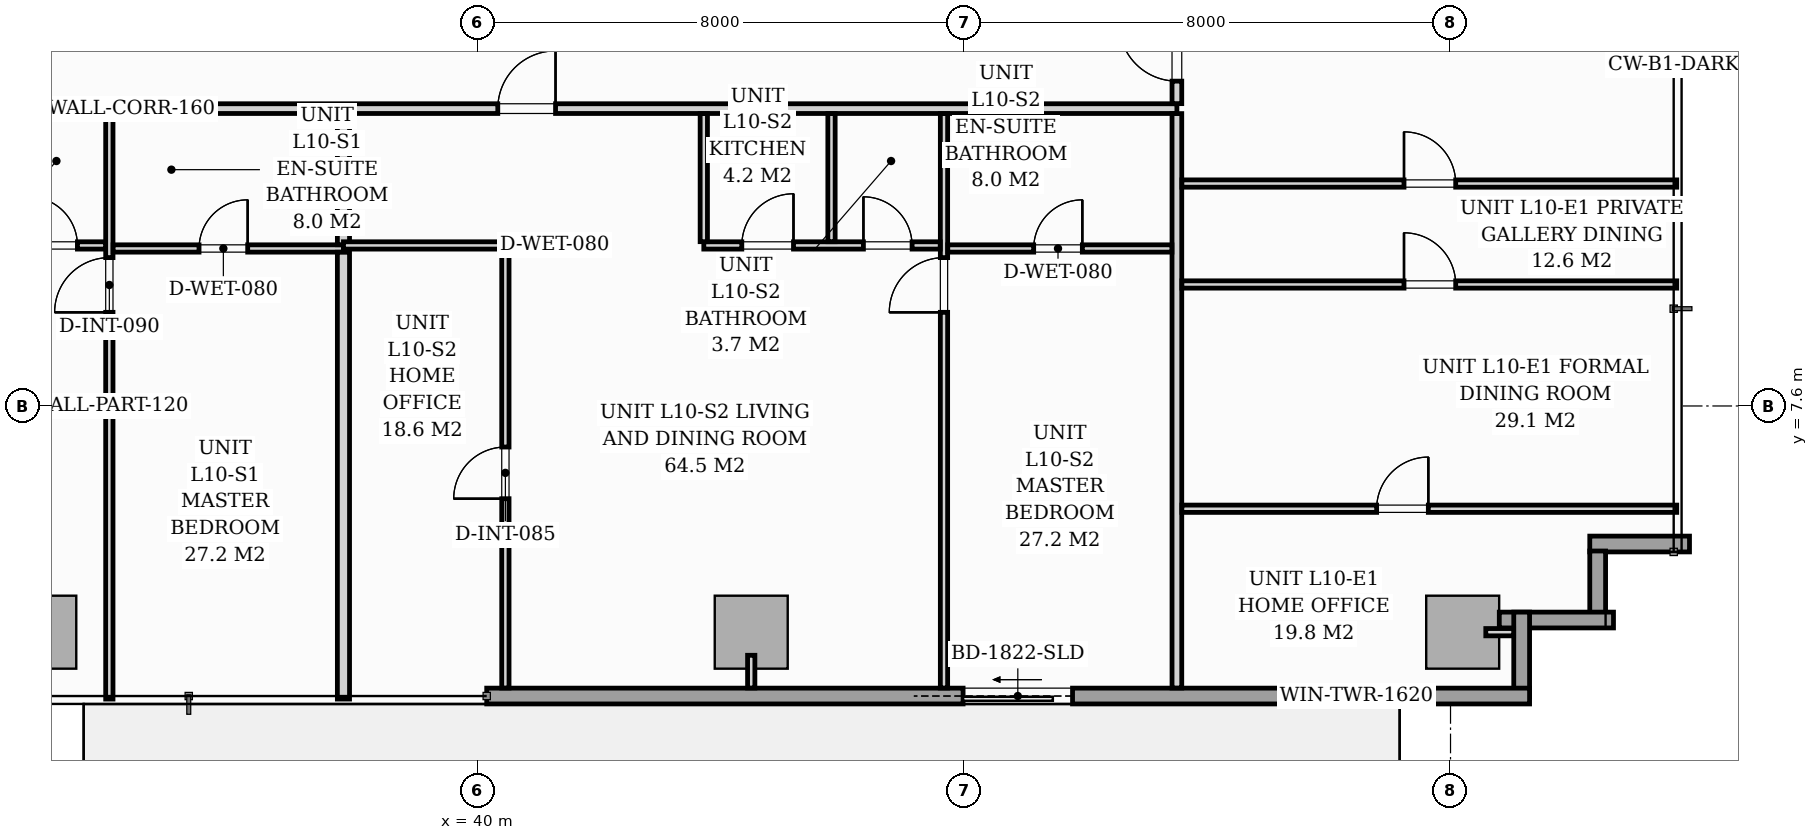
"""IFC4 building model, lengths in metres.
Left out: names, types, materials, properties, quantities, classifications, styles, units other than length and angle.
Written with IfcOpenShell. Run it as: python <this file> out.ifc"""

import sys

from ifc_helpers import new_model, si_unit, direction, frame, frame_2d, origin, origin_2d, place, context, subcontext, project, spatial, rectangle, extrude, source, transform, mapped, element, fill, save


model = new_model("IFC4")
c1 = context("Model", 3, precision=1e-05, world=origin(), true_north=direction((0.0, 1.0)))
c2 = subcontext(c1, "Body", "Model", "MODEL_VIEW")
j1 = project(units=[si_unit("LENGTHUNIT", "METRE"), si_unit("PLANEANGLEUNIT", "RADIAN")], contexts=[c1])
p1 = place(None, origin())
s1 = spatial("IfcSite", under=j1, at=p1, CompositionType="ELEMENT")
p2 = place(p1, origin())
s2 = spatial("IfcBuilding", under=s1, at=p2, CompositionType="ELEMENT")
p3 = place(p2, frame((0.0, 0.0, 39.0)))
s3 = spatial("IfcBuildingStorey", under=s2, at=p3, CompositionType="ELEMENT", Elevation=39.0)
m1 = source(origin(), c2, "Body", "SweptSolid", [
    extrude(rectangle(XDim=1.2, YDim=1.2, at=origin_2d()), origin(), (0.0, 0.0, 1.0), 3.196),
])
for number, where, z_axis, x_axis in (
    (1, (32.8, 3.88, 0.002), (0.0, 0.0, 1.0), (1.0, 0.0, 0.0)),
    (2, (44.5, 3.88, 0.002), (0.0, 0.0, 1.0), (1.0, 0.0, 0.0)),
    (3, (56.2, 3.88, 0.002), (0.0, 0.0, 1.0), (1.0, 0.0, 0.0)),
):
    element("IfcColumn", number, at=place(p3, frame(where, z_axis=z_axis, x_axis=x_axis)), inside=s3, PredefinedType="COLUMN", context=c2, shape_type="MappedRepresentation", body=[
        mapped(m1, transform((0.0, 0.0, 0.0), scale=1.0)),
    ])
p4 = place(p3, frame((59.93, 5.33, 0.0), z_axis=(0.0, 0.0, 1.0), x_axis=(-1.0, 0.0, 0.0)))
e4 = element("IfcWall", 4, at=p4, inside=s3, PredefinedType="STANDARD", context=c2, shape_type="SweptSolid", body=[
    extrude(rectangle(XDim=1.64, YDim=0.26, at=frame_2d((0.82, 0.0))), origin(), (0.0, 0.0, 1.0), 2.94),
])
p5 = place(p3, frame((58.42, 5.215, 0.0), z_axis=(0.0, 0.0, 1.0), x_axis=(0.0, -1.0, 0.0)))
e5 = element("IfcWall", 5, at=p5, inside=s3, PredefinedType="STANDARD", context=c2, shape_type="SweptSolid", body=[
    extrude(rectangle(XDim=1.15, YDim=0.26, at=frame_2d((0.575, 0.0))), origin(), (0.0, 0.0, 1.0), 2.94),
])
p6 = place(p3, frame((58.68, 4.08, 0.0), z_axis=(0.0, 0.0, 1.0), x_axis=(-1.0, 0.0, 0.0)))
e6 = element("IfcWall", 6, at=p6, inside=s3, PredefinedType="STANDARD", context=c2, shape_type="SweptSolid", body=[
    extrude(rectangle(XDim=1.878, YDim=0.26, at=frame_2d((0.939, 0.0))), origin(), (0.0, 0.0, 1.0), 2.94),
])
p7 = place(p3, frame((57.17, 4.21, 0.0), z_axis=(0.0, 0.0, 1.0), x_axis=(0.0, -1.0, 0.0)))
e7 = element("IfcWall", 7, at=p7, inside=s3, PredefinedType="STANDARD", context=c2, shape_type="SweptSolid", body=[
    extrude(rectangle(XDim=1.395, YDim=0.26, at=frame_2d((0.698, 0.0))), origin(), (0.0, 0.0, 1.0), 2.94),
])
p8 = place(p3, frame((57.3, 2.83, 0.0), z_axis=(0.0, 0.0, 1.0), x_axis=(-1.0, 0.0, 0.0)))
e8 = element("IfcWall", 8, at=p8, inside=s3, PredefinedType="STANDARD", context=c2, shape_type="SweptSolid", body=[
    extrude(rectangle(XDim=17.15, YDim=0.26, at=frame_2d((8.575, 0.0))), origin(), (0.0, 0.0, 1.0), 2.94),
])
p9 = place(p8, frame((7.516, 0.0, 0.0)))
e9 = element("IfcOpeningElement", 9, at=p9, cuts=e8, PredefinedType="OPENING", context=c2, shape_type="SweptSolid", body=[
    extrude(rectangle(XDim=1.8, YDim=2.06, at=frame_2d((0.9, 1.03))), frame((0.0, 0.14, 0.0), z_axis=(0.0, -1.0, 0.0), x_axis=(1.0, 0.0, 0.0)), (0.0, 0.0, 1.0), 0.28),
])
p10 = place(p8, frame((2.05, 0.0, 0.65)))
e10 = element("IfcOpeningElement", 10, at=p10, cuts=e8, PredefinedType="OPENING", context=c2, shape_type="SweptSolid", body=[
    extrude(rectangle(XDim=1.6, YDim=1.5, at=frame_2d((0.8, 0.75))), frame((0.0, 0.14, 0.0), z_axis=(0.0, -1.0, 0.0), x_axis=(1.0, 0.0, 0.0)), (0.0, 0.0, 1.0), 0.28),
])
p11 = place(p3, frame((16.3, 12.49, 0.0), z_axis=(0.0, 0.0, 1.0), x_axis=(1.0, 0.0, 0.0)))
e11 = element("IfcWall", 11, at=p11, inside=s3, PredefinedType="PARTITIONING", context=c2, shape_type="SweptSolid", body=[
    extrude(rectangle(XDim=35.2, YDim=0.16, at=frame_2d((17.6, 0.0))), origin(), (0.0, 0.0, 1.0), 2.94),
])
p12 = place(p11, frame((11.072, 0.0, 0.0)))
e12 = element("IfcOpeningElement", 12, at=p12, cuts=e11, PredefinedType="OPENING", context=c2, shape_type="SweptSolid", body=[
    extrude(rectangle(XDim=0.95, YDim=2.06, at=frame_2d((0.475, 1.03))), frame((0.0, 0.09, 0.0), z_axis=(0.0, -1.0, 0.0), x_axis=(1.0, 0.0, 0.0)), (0.0, 0.0, 1.0), 0.18),
])
p13 = place(p11, frame((24.032, 0.0, 0.0)))
e13 = element("IfcOpeningElement", 13, at=p13, cuts=e11, PredefinedType="OPENING", context=c2, shape_type="SweptSolid", body=[
    extrude(rectangle(XDim=0.95, YDim=2.06, at=frame_2d((0.475, 1.03))), frame((0.0, 0.09, 0.0), z_axis=(0.0, -1.0, 0.0), x_axis=(1.0, 0.0, 0.0)), (0.0, 0.0, 1.0), 0.18),
])
p14 = place(p3, frame((51.5, 2.962, 0.0), z_axis=(0.0, 0.0, 1.0), x_axis=(0.0, 1.0, 0.0)))
e14 = element("IfcWall", 14, at=p14, inside=s3, PredefinedType="PARTITIONING", context=c2, shape_type="SweptSolid", body=[
    extrude(rectangle(XDim=9.446, YDim=0.16, at=frame_2d((4.723, 0.0))), origin(), (0.0, 0.0, 1.0), 2.94),
])
p15 = place(p3, frame((51.5, 12.572, 0.0), z_axis=(0.0, 0.0, 1.0), x_axis=(0.0, 1.0, 0.0)))
e15 = element("IfcWall", 15, at=p15, inside=s3, PredefinedType="PARTITIONING", context=c2, shape_type="SweptSolid", body=[
    extrude(rectangle(XDim=14.866, YDim=0.16, at=frame_2d((7.433, 0.0))), origin(), (0.0, 0.0, 1.0), 2.94),
])
p16 = place(p15, frame((0.37, 0.0, 0.0)))
e16 = element("IfcOpeningElement", 16, at=p16, cuts=e15, PredefinedType="OPENING", context=c2, shape_type="SweptSolid", body=[
    extrude(rectangle(XDim=0.95, YDim=2.06, at=frame_2d((0.475, 1.03))), frame((0.0, 0.09, 0.0), z_axis=(0.0, -1.0, 0.0), x_axis=(1.0, 0.0, 0.0)), (0.0, 0.0, 1.0), 0.18),
])
p17 = place(p3, frame((33.944, 2.78, 0.0), z_axis=(0.0, 0.0, 1.0), x_axis=(0.0, 1.0, 0.0)))
e17 = element("IfcWall", 17, at=p17, inside=s3, PredefinedType="PARTITIONING", context=c2, shape_type="SweptSolid", body=[
    extrude(rectangle(XDim=9.628, YDim=0.12, at=frame_2d((4.814, 0.0))), origin(), (0.0, 0.0, 1.0), 2.94),
])
p18 = place(p17, frame((6.36, 0.0, 0.0)))
e18 = element("IfcOpeningElement", 18, at=p18, cuts=e17, PredefinedType="OPENING", context=c2, shape_type="SweptSolid", body=[
    extrude(rectangle(XDim=0.9, YDim=2.05, at=frame_2d((0.45, 1.025))), frame((0.0, 0.07, 0.0), z_axis=(0.0, -1.0, 0.0), x_axis=(1.0, 0.0, 0.0)), (0.0, 0.0, 1.0), 0.14),
])
p19 = place(p3, frame((29.994, 10.24, 0.0), z_axis=(0.0, 0.0, 1.0), x_axis=(1.0, 0.0, 0.0)))
e19 = element("IfcWall", 19, at=p19, inside=s3, PredefinedType="PARTITIONING", context=c2, shape_type="SweptSolid", body=[
    extrude(rectangle(XDim=3.888, YDim=0.12, at=frame_2d((1.944, 0.0))), origin(), (0.0, 0.0, 1.0), 2.94),
])
p20 = place(p19, frame((0.625, 0.0, 0.0)))
e20 = element("IfcOpeningElement", 20, at=p20, cuts=e19, PredefinedType="OPENING", context=c2, shape_type="SweptSolid", body=[
    extrude(rectangle(XDim=0.85, YDim=2.05, at=frame_2d((0.425, 1.025))), frame((0.0, 0.07, 0.0), z_axis=(0.0, -1.0, 0.0), x_axis=(1.0, 0.0, 0.0)), (0.0, 0.0, 1.0), 0.14),
])
p21 = place(p19, frame((2.625, 0.0, 0.0)))
e21 = element("IfcOpeningElement", 21, at=p21, cuts=e19, PredefinedType="OPENING", context=c2, shape_type="SweptSolid", body=[
    extrude(rectangle(XDim=0.8, YDim=2.02, at=frame_2d((0.4, 1.01))), frame((0.0, 0.07, 0.0), z_axis=(0.0, -1.0, 0.0), x_axis=(1.0, 0.0, 0.0)), (0.0, 0.0, 1.0), 0.14),
])
p22 = place(p3, frame((34.006, 10.19, 0.0), z_axis=(0.0, 0.0, 1.0), x_axis=(1.0, 0.0, 0.0)))
e22 = element("IfcWall", 22, at=p22, inside=s3, PredefinedType="PARTITIONING", context=c2, shape_type="SweptSolid", body=[
    extrude(rectangle(XDim=3.788, YDim=0.12, at=frame_2d((1.894, 0.0))), origin(), (0.0, 0.0, 1.0), 2.94),
])
p23 = place(p22, frame((1.413, 0.0, 0.0)))
e23 = element("IfcOpeningElement", 23, at=p23, cuts=e22, PredefinedType="OPENING", context=c2, shape_type="SweptSolid", body=[
    extrude(rectangle(XDim=0.8, YDim=2.02, at=frame_2d((0.4, 1.01))), frame((0.0, 0.07, 0.0), z_axis=(0.0, -1.0, 0.0), x_axis=(1.0, 0.0, 0.0)), (0.0, 0.0, 1.0), 0.14),
])
p24 = place(p3, frame((37.794, 2.78, 0.0), z_axis=(0.0, 0.0, 1.0), x_axis=(0.0, 1.0, 0.0)))
e24 = element("IfcWall", 24, at=p24, inside=s3, PredefinedType="PARTITIONING", context=c2, shape_type="SweptSolid", body=[
    extrude(rectangle(XDim=7.348, YDim=0.2, at=frame_2d((3.674, 0.0))), origin(), (0.0, 0.0, 1.0), 2.94),
])
p25 = place(p3, frame((37.794, 10.252, 0.0), z_axis=(0.0, 0.0, 1.0), x_axis=(0.0, 1.0, 0.0)))
e25 = element("IfcWall", 25, at=p25, inside=s3, PredefinedType="PARTITIONING", context=c2, shape_type="SweptSolid", body=[
    extrude(rectangle(XDim=2.156, YDim=0.2, at=frame_2d((1.078, 0.0))), origin(), (0.0, 0.0, 1.0), 2.94),
])
p26 = place(p3, frame((47.67, 2.962, 0.0), z_axis=(0.0, 0.0, 1.0), x_axis=(0.0, 1.0, 0.0)))
e26 = element("IfcWall", 26, at=p26, inside=s3, PredefinedType="PARTITIONING", context=c2, shape_type="SweptSolid", body=[
    extrude(rectangle(XDim=9.446, YDim=0.12, at=frame_2d((4.723, 0.0))), origin(), (0.0, 0.0, 1.0), 2.94),
])
p27 = place(p26, frame((6.178, 0.0, 0.0)))
e27 = element("IfcOpeningElement", 27, at=p27, cuts=e26, PredefinedType="OPENING", context=c2, shape_type="SweptSolid", body=[
    extrude(rectangle(XDim=0.9, YDim=2.05, at=frame_2d((0.45, 1.025))), frame((0.0, 0.07, 0.0), z_axis=(0.0, -1.0, 0.0), x_axis=(1.0, 0.0, 0.0)), (0.0, 0.0, 1.0), 0.14),
])
p28 = place(p3, frame((43.72, 10.24, 0.0), z_axis=(0.0, 0.0, 1.0), x_axis=(1.0, 0.0, 0.0)))
e28 = element("IfcWall", 28, at=p28, inside=s3, PredefinedType="PARTITIONING", context=c2, shape_type="SweptSolid", body=[
    extrude(rectangle(XDim=3.888, YDim=0.12, at=frame_2d((1.944, 0.0))), origin(), (0.0, 0.0, 1.0), 2.94),
])
p29 = place(p28, frame((0.625, 0.0, 0.0)))
e29 = element("IfcOpeningElement", 29, at=p29, cuts=e28, PredefinedType="OPENING", context=c2, shape_type="SweptSolid", body=[
    extrude(rectangle(XDim=0.85, YDim=2.05, at=frame_2d((0.425, 1.025))), frame((0.0, 0.07, 0.0), z_axis=(0.0, -1.0, 0.0), x_axis=(1.0, 0.0, 0.0)), (0.0, 0.0, 1.0), 0.14),
])
p30 = place(p28, frame((2.625, 0.0, 0.0)))
e30 = element("IfcOpeningElement", 30, at=p30, cuts=e28, PredefinedType="OPENING", context=c2, shape_type="SweptSolid", body=[
    extrude(rectangle(XDim=0.8, YDim=2.02, at=frame_2d((0.4, 1.01))), frame((0.0, 0.07, 0.0), z_axis=(0.0, -1.0, 0.0), x_axis=(1.0, 0.0, 0.0)), (0.0, 0.0, 1.0), 0.14),
])
for number, where, z_axis, x_axis in (
    (31, (45.82, 10.302, 0.0), (0.0, 0.0, 1.0), (0.0, 1.0, 0.0)),
    (32, (43.72, 10.302, 0.0), (0.0, 0.0, 1.0), (0.0, 1.0, 0.0)),
):
    element("IfcWall", number, at=place(p3, frame(where, z_axis=z_axis, x_axis=x_axis)), inside=s3, PredefinedType="PARTITIONING", context=c2, shape_type="SweptSolid", body=[
        extrude(rectangle(XDim=2.106, YDim=0.12, at=frame_2d((1.053, 0.0))), origin(), (0.0, 0.0, 1.0), 2.94),
    ])
p31 = place(p3, frame((47.732, 10.19, 0.0), z_axis=(0.0, 0.0, 1.0), x_axis=(1.0, 0.0, 0.0)))
e33 = element("IfcWall", 33, at=p31, inside=s3, PredefinedType="PARTITIONING", context=c2, shape_type="SweptSolid", body=[
    extrude(rectangle(XDim=3.686, YDim=0.12, at=frame_2d((1.843, 0.0))), origin(), (0.0, 0.0, 1.0), 2.94),
])
p32 = place(p31, frame((1.413, 0.0, 0.0)))
e34 = element("IfcOpeningElement", 34, at=p32, cuts=e33, PredefinedType="OPENING", context=c2, shape_type="SweptSolid", body=[
    extrude(rectangle(XDim=0.8, YDim=2.02, at=frame_2d((0.4, 1.01))), frame((0.0, 0.07, 0.0), z_axis=(0.0, -1.0, 0.0), x_axis=(1.0, 0.0, 0.0)), (0.0, 0.0, 1.0), 0.14),
])
p33 = place(p3, frame((40.457, 2.962, 0.0), z_axis=(0.0, 0.0, 1.0), x_axis=(0.0, 1.0, 0.0)))
e35 = element("IfcWall", 35, at=p33, inside=s3, PredefinedType="PARTITIONING", context=c2, shape_type="SweptSolid", body=[
    extrude(rectangle(XDim=7.278, YDim=0.12, at=frame_2d((3.639, 0.0))), origin(), (0.0, 0.0, 1.0), 2.94),
])
p34 = place(p33, frame((3.113, 0.0, 0.0)))
e36 = element("IfcOpeningElement", 36, at=p34, cuts=e35, PredefinedType="OPENING", context=c2, shape_type="SweptSolid", body=[
    extrude(rectangle(XDim=0.85, YDim=2.05, at=frame_2d((0.425, 1.025))), frame((0.0, 0.07, 0.0), z_axis=(0.0, -1.0, 0.0), x_axis=(1.0, 0.0, 0.0)), (0.0, 0.0, 1.0), 0.14),
])
p35 = place(p3, frame((37.794, 10.24, 0.0), z_axis=(0.0, 0.0, 1.0), x_axis=(1.0, 0.0, 0.0)))
e37 = element("IfcWall", 37, at=p35, inside=s3, PredefinedType="PARTITIONING", context=c2, shape_type="SweptSolid", body=[
    extrude(rectangle(XDim=2.601, YDim=0.12, at=frame_2d((1.301, 0.0))), origin(), (0.0, 0.0, 1.0), 2.94),
])
p36 = place(p3, frame((51.582, 5.91, 0.0), z_axis=(0.0, 0.0, 1.0), x_axis=(1.0, 0.0, 0.0)))
e38 = element("IfcWall", 38, at=p36, inside=s3, PredefinedType="PARTITIONING", context=c2, shape_type="SweptSolid", body=[
    extrude(rectangle(XDim=8.138, YDim=0.12, at=frame_2d((4.069, 0.0))), origin(), (0.0, 0.0, 1.0), 2.94),
])
p37 = place(p36, frame((3.203, 0.0, 0.0)))
e39 = element("IfcOpeningElement", 39, at=p37, cuts=e38, PredefinedType="OPENING", context=c2, shape_type="SweptSolid", body=[
    extrude(rectangle(XDim=0.85, YDim=2.05, at=frame_2d((0.425, 1.025))), frame((0.0, 0.07, 0.0), z_axis=(0.0, -1.0, 0.0), x_axis=(1.0, 0.0, 0.0)), (0.0, 0.0, 1.0), 0.14),
])
p38 = place(p3, frame((51.582, 9.598, 0.0), z_axis=(0.0, 0.0, 1.0), x_axis=(1.0, 0.0, 0.0)))
e40 = element("IfcWall", 40, at=p38, inside=s3, PredefinedType="PARTITIONING", context=c2, shape_type="SweptSolid", body=[
    extrude(rectangle(XDim=8.138, YDim=0.12, at=frame_2d((4.069, 0.0))), origin(), (0.0, 0.0, 1.0), 2.94),
])
p39 = place(p38, frame((3.653, 0.0, 0.0)))
e41 = element("IfcOpeningElement", 41, at=p39, cuts=e40, PredefinedType="OPENING", context=c2, shape_type="SweptSolid", body=[
    extrude(rectangle(XDim=0.85, YDim=2.05, at=frame_2d((0.425, 1.025))), frame((0.0, 0.07, 0.0), z_axis=(0.0, -1.0, 0.0), x_axis=(1.0, 0.0, 0.0)), (0.0, 0.0, 1.0), 0.14),
])
p40 = place(p3, frame((51.582, 11.258, 0.0), z_axis=(0.0, 0.0, 1.0), x_axis=(1.0, 0.0, 0.0)))
e42 = element("IfcWall", 42, at=p40, inside=s3, PredefinedType="PARTITIONING", context=c2, shape_type="SweptSolid", body=[
    extrude(rectangle(XDim=8.138, YDim=0.12, at=frame_2d((4.069, 0.0))), origin(), (0.0, 0.0, 1.0), 2.94),
])
p41 = place(p40, frame((3.653, 0.0, 0.0)))
e43 = element("IfcOpeningElement", 43, at=p41, cuts=e42, PredefinedType="OPENING", context=c2, shape_type="SweptSolid", body=[
    extrude(rectangle(XDim=0.85, YDim=2.05, at=frame_2d((0.425, 1.025))), frame((0.0, 0.07, 0.0), z_axis=(0.0, -1.0, 0.0), x_axis=(1.0, 0.0, 0.0)), (0.0, 0.0, 1.0), 0.14),
])
p42 = place(p3, frame((44.5, 3.5, 0.0), z_axis=(0.0, 0.0, 1.0), x_axis=(0.0, -1.0, 0.0)))
e44 = element("IfcWall", 44, at=p42, inside=s3, PredefinedType="PARTITIONING", context=c2, shape_type="SweptSolid", body=[
    extrude(rectangle(XDim=0.538, YDim=0.12, at=frame_2d((0.269, 0.0))), origin(), (0.0, 0.0, 1.0), 2.94),
])
p43 = place(p3, frame((56.58, 3.88, 0.0), z_axis=(0.0, 0.0, 1.0), x_axis=(1.0, 0.0, 0.0)))
e45 = element("IfcWall", 45, at=p43, inside=s3, PredefinedType="PARTITIONING", context=c2, shape_type="SweptSolid", body=[
    extrude(rectangle(XDim=0.458, YDim=0.12, at=frame_2d((0.229, 0.0))), origin(), (0.0, 0.0, 1.0), 2.94),
])
m2 = source(origin(), c2, "Body", "SweptSolid", [
    extrude(rectangle(XDim=1.8, YDim=2.06, at=frame_2d((0.9, 1.03))), frame((0.0, 0.025, 0.0), z_axis=(0.0, -1.0, 0.0), x_axis=(1.0, 0.0, 0.0)), (0.0, 0.0, 1.0), 0.05),
])
p44 = place(p9, origin())
e46 = element("IfcDoor", 46, at=p44, inside=s3, OperationType="SLIDING_TO_RIGHT", PredefinedType="DOOR", context=c2, shape_type="MappedRepresentation", body=[
    mapped(m2, transform((0.0, 0.0, 0.0), scale=1.0)),
])
fill(e9, e46)
m3 = source(origin(), c2, "Body", "SweptSolid", [
    extrude(rectangle(XDim=1.6, YDim=1.5, at=frame_2d((0.8, 0.75))), frame((0.0, 0.03, 0.0), z_axis=(0.0, -1.0, 0.0), x_axis=(1.0, 0.0, 0.0)), (0.0, 0.0, 1.0), 0.06),
])
p45 = place(p10, origin())
e47 = element("IfcWindow", 47, at=p45, inside=s3, PartitioningType="SINGLE_PANEL", PredefinedType="WINDOW", context=c2, shape_type="MappedRepresentation", body=[
    mapped(m3, transform((0.0, 0.0, 0.0), scale=1.0)),
])
fill(e10, e47)
m4 = source(origin(), c2, "Body", "SweptSolid", [
    extrude(rectangle(XDim=0.8, YDim=2.02, at=frame_2d((0.4, 1.01))), frame((0.0, 0.025, 0.0), z_axis=(0.0, -1.0, 0.0), x_axis=(1.0, 0.0, 0.0)), (0.0, 0.0, 1.0), 0.05),
])
p46 = place(p23, origin())
e48 = element("IfcDoor", 48, at=p46, inside=s3, OperationType="SINGLE_SWING_RIGHT", PredefinedType="DOOR", context=c2, shape_type="MappedRepresentation", body=[
    mapped(m4, transform((0.0, 0.0, 0.0), scale=1.0)),
])
fill(e23, e48)
m5 = source(origin(), c2, "Body", "SweptSolid", [
    extrude(rectangle(XDim=0.9, YDim=2.05, at=frame_2d((0.45, 1.025))), frame((0.0, 0.025, 0.0), z_axis=(0.0, -1.0, 0.0), x_axis=(1.0, 0.0, 0.0)), (0.0, 0.0, 1.0), 0.05),
])
p47 = place(p18, origin())
e49 = element("IfcDoor", 49, at=p47, inside=s3, OperationType="SINGLE_SWING_LEFT", PredefinedType="DOOR", context=c2, shape_type="MappedRepresentation", body=[
    mapped(m5, transform((0.0, 0.0, 0.0), scale=1.0)),
])
fill(e18, e49)
p48 = place(p21, origin())
e50 = element("IfcDoor", 50, at=p48, inside=s3, OperationType="SINGLE_SWING_LEFT", PredefinedType="DOOR", context=c2, shape_type="MappedRepresentation", body=[
    mapped(m4, transform((0.0, 0.0, 0.0), scale=1.0)),
])
fill(e21, e50)
p49 = place(p32, origin())
e51 = element("IfcDoor", 51, at=p49, inside=s3, OperationType="SINGLE_SWING_RIGHT", PredefinedType="DOOR", context=c2, shape_type="MappedRepresentation", body=[
    mapped(m4, transform((0.0, 0.0, 0.0), scale=1.0)),
])
fill(e34, e51)
m6 = source(origin(), c2, "Body", "SweptSolid", [
    extrude(rectangle(XDim=0.85, YDim=2.05, at=frame_2d((0.425, 1.025))), frame((0.0, 0.025, 0.0), z_axis=(0.0, -1.0, 0.0), x_axis=(1.0, 0.0, 0.0)), (0.0, 0.0, 1.0), 0.05),
])
p50 = place(p34, origin())
e52 = element("IfcDoor", 52, at=p50, inside=s3, OperationType="SINGLE_SWING_LEFT", PredefinedType="DOOR", context=c2, shape_type="MappedRepresentation", body=[
    mapped(m6, transform((0.0, 0.0, 0.0), scale=1.0)),
])
fill(e36, e52)
m7 = source(origin(), c2, "Body", "SweptSolid", [
    extrude(rectangle(XDim=0.95, YDim=2.06, at=frame_2d((0.475, 1.03))), frame((0.0, 0.025, 0.0), z_axis=(0.0, -1.0, 0.0), x_axis=(1.0, 0.0, 0.0)), (0.0, 0.0, 1.0), 0.05),
])
p51 = place(p13, origin())
e53 = element("IfcDoor", 53, at=p51, inside=s3, OperationType="SINGLE_SWING_RIGHT", PredefinedType="DOOR", context=c2, shape_type="MappedRepresentation", body=[
    mapped(m7, transform((0.0, 0.0, 0.0), scale=1.0)),
])
fill(e13, e53)
p52 = place(p27, origin())
e54 = element("IfcDoor", 54, at=p52, inside=s3, OperationType="SINGLE_SWING_LEFT", PredefinedType="DOOR", context=c2, shape_type="MappedRepresentation", body=[
    mapped(m5, transform((0.0, 0.0, 0.0), scale=1.0)),
])
fill(e27, e54)
p53 = place(p29, origin())
e55 = element("IfcDoor", 55, at=p53, inside=s3, OperationType="SINGLE_SWING_RIGHT", PredefinedType="DOOR", context=c2, shape_type="MappedRepresentation", body=[
    mapped(m6, transform((0.0, 0.0, 0.0), scale=1.0)),
])
fill(e29, e55)
p54 = place(p30, origin())
e56 = element("IfcDoor", 56, at=p54, inside=s3, OperationType="SINGLE_SWING_LEFT", PredefinedType="DOOR", context=c2, shape_type="MappedRepresentation", body=[
    mapped(m4, transform((0.0, 0.0, 0.0), scale=1.0)),
])
fill(e30, e56)
p55 = place(p16, origin())
e57 = element("IfcDoor", 57, at=p55, inside=s3, OperationType="SINGLE_SWING_RIGHT", PredefinedType="DOOR", context=c2, shape_type="MappedRepresentation", body=[
    mapped(m7, transform((0.0, 0.0, 0.0), scale=1.0)),
])
fill(e16, e57)
p56 = place(p37, origin())
e58 = element("IfcDoor", 58, at=p56, inside=s3, OperationType="SINGLE_SWING_RIGHT", PredefinedType="DOOR", context=c2, shape_type="MappedRepresentation", body=[
    mapped(m6, transform((0.0, 0.0, 0.0), scale=1.0)),
])
fill(e39, e58)
p57 = place(p39, origin())
e59 = element("IfcDoor", 59, at=p57, inside=s3, OperationType="SINGLE_SWING_LEFT", PredefinedType="DOOR", context=c2, shape_type="MappedRepresentation", body=[
    mapped(m6, transform((0.0, 0.0, 0.0), scale=1.0)),
])
fill(e41, e59)
p58 = place(p41, origin())
e60 = element("IfcDoor", 60, at=p58, inside=s3, OperationType="SINGLE_SWING_LEFT", PredefinedType="DOOR", context=c2, shape_type="MappedRepresentation", body=[
    mapped(m6, transform((0.0, 0.0, 0.0), scale=1.0)),
])
fill(e43, e60)
save(model, sys.argv[1])
